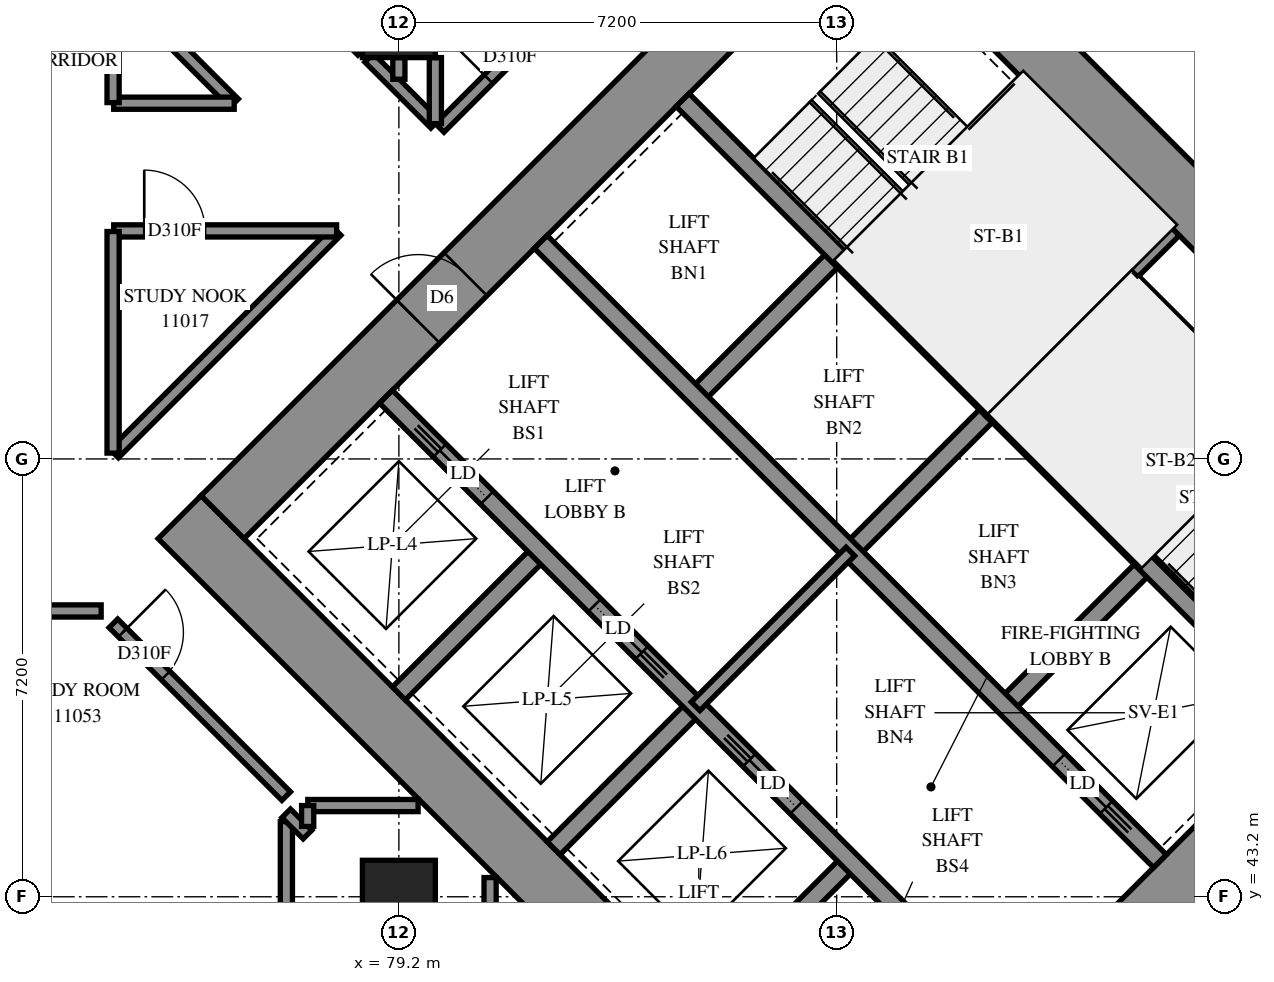
"""IFC4 building model, lengths in metres.
Left out: names, types, materials, properties, quantities, classifications, styles, units other than length and angle.
Written with IfcOpenShell. Run it as: python <this file> out.ifc"""

import sys

from ifc_helpers import new_model, si_unit, direction, frame, frame_2d, origin, origin_2d, place, context, subcontext, project, spatial, rectangle, extrude, element, fill, save


model = new_model("IFC4")
c1 = context("Model", 3, precision=1e-05, world=origin(), true_north=direction((0.0, 1.0)))
c2 = subcontext(c1, "Body", "Model", "MODEL_VIEW")
j1 = project(units=[si_unit("LENGTHUNIT", "METRE"), si_unit("PLANEANGLEUNIT", "RADIAN")], contexts=[c1])
p1 = place(None, origin())
s1 = spatial("IfcSite", under=j1, at=p1, CompositionType="ELEMENT")
p2 = place(p1, origin())
s2 = spatial("IfcBuilding", under=s1, at=p2, CompositionType="ELEMENT")
p3 = place(p2, frame((0.0, 0.0, 44.0)))
s3 = spatial("IfcBuildingStorey", under=s2, at=p3, CompositionType="ELEMENT", Elevation=44.0)
for number, where, z_axis, x_axis in (
    (1, (79.2, 43.2, 0.0), (0.0, 0.0, 1.0), (1.0, 0.0, 0.0)),
    (2, (79.2, 57.6, 0.0), (0.0, 0.0, 1.0), (1.0, 0.0, 0.0)),
):
    element("IfcColumn", number, at=place(p3, frame(where, z_axis=z_axis, x_axis=x_axis)), inside=s3, PredefinedType="COLUMN", context=c2, shape_type="SweptSolid", body=[
        extrude(rectangle(XDim=1.2, YDim=1.2, at=origin_2d()), origin(), (0.0, 0.0, 1.0), 3.1),
    ])
p4 = place(p3, frame((75.594, 49.443, -0.3), z_axis=(0.0, 0.0, 1.0), x_axis=(0.7071037324, -0.70710983, 0.0)))
e3 = element("IfcWall", 3, at=p4, inside=s3, PredefinedType="SHEAR", context=c2, shape_type="SweptSolid", body=[
    extrude(rectangle(XDim=16.4, YDim=1.0, at=frame_2d((8.2, 0.0))), origin(), (0.0, 0.0, 1.0), 2.7),
])
p5 = place(p3, frame((86.483, 60.333, -0.3), z_axis=(0.0, 0.0, 1.0), x_axis=(0.70710983, -0.7071037324, 0.0)))
e4 = element("IfcWall", 4, at=p5, inside=s3, PredefinedType="SHEAR", context=c2, shape_type="SweptSolid", body=[
    extrude(rectangle(XDim=16.4, YDim=1.0, at=frame_2d((8.2, 0.0))), origin(), (0.0, 0.0, 1.0), 2.7),
])
p6 = place(p5, frame((11.0, 0.0, 0.3)))
e5 = element("IfcOpeningElement", 5, at=p6, cuts=e4, PredefinedType="OPENING", context=c2, shape_type="SweptSolid", body=[
    extrude(rectangle(XDim=0.8, YDim=2.1, at=frame_2d((0.4, 1.05))), frame((0.0, 0.51, 0.0), z_axis=(0.0, -1.0, 0.0), x_axis=(1.0, 0.0, 0.0)), (0.0, 0.0, 1.0), 1.02),
])
p7 = place(p3, frame((76.301, 49.443, -0.3), z_axis=(0.0, 0.0, 1.0), x_axis=(0.7071067812, 0.7071067812, 0.0)))
e6 = element("IfcWall", 6, at=p7, inside=s3, PredefinedType="SHEAR", context=c2, shape_type="SweptSolid", body=[
    extrude(rectangle(XDim=14.4, YDim=1.0, at=frame_2d((7.2, 0.0))), origin(), (0.0, 0.0, 1.0), 2.7),
])
p8 = place(p7, frame((4.55, 0.0, 0.3)))
e7 = element("IfcOpeningElement", 7, at=p8, cuts=e6, PredefinedType="OPENING", context=c2, shape_type="SweptSolid", body=[
    extrude(rectangle(XDim=1.1, YDim=2.1, at=frame_2d((0.55, 1.05))), frame((0.0, 0.51, 0.0), z_axis=(0.0, -1.0, 0.0), x_axis=(1.0, 0.0, 0.0)), (0.0, 0.0, 1.0), 1.02),
])
p9 = place(p7, frame((11.35, 0.0, 0.3)))
e8 = element("IfcOpeningElement", 8, at=p9, cuts=e6, PredefinedType="OPENING", context=c2, shape_type="SweptSolid", body=[
    extrude(rectangle(XDim=1.1, YDim=2.1, at=frame_2d((0.55, 1.05))), frame((0.0, 0.51, 0.0), z_axis=(0.0, -1.0, 0.0), x_axis=(1.0, 0.0, 0.0)), (0.0, 0.0, 1.0), 1.02),
])
p10 = place(p3, frame((87.19, 38.554, -0.3), z_axis=(0.0, 0.0, 1.0), x_axis=(0.707103309, 0.7071102534, 0.0)))
e9 = element("IfcWall", 9, at=p10, inside=s3, PredefinedType="SHEAR", context=c2, shape_type="SweptSolid", body=[
    extrude(rectangle(XDim=14.4, YDim=1.0, at=frame_2d((7.2, 0.0))), origin(), (0.0, 0.0, 1.0), 2.7),
])
p11 = place(p10, frame((4.55, 0.0, 0.3)))
e10 = element("IfcOpeningElement", 10, at=p11, cuts=e9, PredefinedType="OPENING", context=c2, shape_type="SweptSolid", body=[
    extrude(rectangle(XDim=1.1, YDim=2.1, at=frame_2d((0.55, 1.05))), frame((0.0, 0.51, 0.0), z_axis=(0.0, -1.0, 0.0), x_axis=(1.0, 0.0, 0.0)), (0.0, 0.0, 1.0), 1.02),
])
p12 = place(p10, frame((11.35, 0.0, 0.3)))
e11 = element("IfcOpeningElement", 11, at=p12, cuts=e9, PredefinedType="OPENING", context=c2, shape_type="SweptSolid", body=[
    extrude(rectangle(XDim=1.1, YDim=2.1, at=frame_2d((0.55, 1.05))), frame((0.0, 0.51, 0.0), z_axis=(0.0, -1.0, 0.0), x_axis=(1.0, 0.0, 0.0)), (0.0, 0.0, 1.0), 1.02),
])
for number, where, z_axis, x_axis in (
    (12, (79.2, 46.544, 0.0), (0.0, 0.0, 1.0), (0.707, 0.707, 0.0)),
    (13, (84.079, 51.423, 0.0), (0.0, 0.0, 1.0), (0.707, 0.707, 0.0)),
):
    element("IfcWall", number, at=place(p3, frame(where, z_axis=z_axis, x_axis=x_axis)), inside=s3, PredefinedType="SOLIDWALL", context=c2, shape_type="SweptSolid", body=[
        extrude(rectangle(XDim=3.3, YDim=0.3, at=frame_2d((1.65, 0.0))), origin(), (0.0, 0.0, 1.0), 3.1),
    ])
p13 = place(p3, frame((81.746, 43.999, 0.0), z_axis=(0.0, 0.0, 1.0), x_axis=(0.7071067812, 0.7071067812, 0.0)))
e14 = element("IfcWall", 14, at=p13, inside=s3, PredefinedType="SOLIDWALL", context=c2, shape_type="SweptSolid", body=[
    extrude(rectangle(XDim=3.3, YDim=0.3, at=frame_2d((1.65, 0.0))), origin(), (0.0, 0.0, 1.0), 3.1),
])
p14 = place(p3, frame((86.625, 48.878, 0.0), z_axis=(0.0, 0.0, 1.0), x_axis=(0.7071067812, 0.7071067812, 0.0)))
e15 = element("IfcWall", 15, at=p14, inside=s3, PredefinedType="SOLIDWALL", context=c2, shape_type="SweptSolid", body=[
    extrude(rectangle(XDim=3.3, YDim=0.3, at=frame_2d((1.65, 0.0))), origin(), (0.0, 0.0, 1.0), 3.1),
])
p15 = place(p3, frame((84.291, 41.453, 0.0), z_axis=(0.0, 0.0, 1.0), x_axis=(0.7071067812, 0.7071067812, 0.0)))
e16 = element("IfcWall", 16, at=p15, inside=s3, PredefinedType="SOLIDWALL", context=c2, shape_type="SweptSolid", body=[
    extrude(rectangle(XDim=3.3, YDim=0.3, at=frame_2d((1.65, 0.0))), origin(), (0.0, 0.0, 1.0), 3.1),
])
p16 = place(p3, frame((89.17, 46.332, 0.0), z_axis=(0.0, 0.0, 1.0), x_axis=(0.7071067812, 0.7071067812, 0.0)))
e17 = element("IfcWall", 17, at=p16, inside=s3, PredefinedType="SOLIDWALL", context=c2, shape_type="SweptSolid", body=[
    extrude(rectangle(XDim=3.3, YDim=0.3, at=frame_2d((1.65, 0.0))), origin(), (0.0, 0.0, 1.0), 3.1),
])
p17 = place(p3, frame((78.988, 51.423, 0.0), z_axis=(0.0, 0.0, 1.0), x_axis=(0.7071067812, -0.7071067812, 0.0)))
e18 = element("IfcWall", 18, at=p17, inside=s3, PredefinedType="SOLIDWALL", context=c2, shape_type="SweptSolid", body=[
    extrude(rectangle(XDim=14.4, YDim=0.3, at=frame_2d((7.2, 0.0))), origin(), (0.0, 0.0, 1.0), 3.1),
])
p18 = place(p17, frame((1.25, 0.0, 0.0)))
e19 = element("IfcOpeningElement", 19, at=p18, cuts=e18, PredefinedType="OPENING", context=c2, shape_type="SweptSolid", body=[
    extrude(rectangle(XDim=1.1, YDim=2.1, at=frame_2d((0.55, 1.05))), frame((0.0, 0.16, 0.0), z_axis=(0.0, -1.0, 0.0), x_axis=(1.0, 0.0, 0.0)), (0.0, 0.0, 1.0), 0.32),
])
p19 = place(p17, frame((4.85, 0.0, 0.0)))
e20 = element("IfcOpeningElement", 20, at=p19, cuts=e18, PredefinedType="OPENING", context=c2, shape_type="SweptSolid", body=[
    extrude(rectangle(XDim=1.1, YDim=2.1, at=frame_2d((0.55, 1.05))), frame((0.0, 0.16, 0.0), z_axis=(0.0, -1.0, 0.0), x_axis=(1.0, 0.0, 0.0)), (0.0, 0.0, 1.0), 0.32),
])
p20 = place(p17, frame((8.45, 0.0, 0.0)))
e21 = element("IfcOpeningElement", 21, at=p20, cuts=e18, PredefinedType="OPENING", context=c2, shape_type="SweptSolid", body=[
    extrude(rectangle(XDim=1.1, YDim=2.1, at=frame_2d((0.55, 1.05))), frame((0.0, 0.16, 0.0), z_axis=(0.0, -1.0, 0.0), x_axis=(1.0, 0.0, 0.0)), (0.0, 0.0, 1.0), 0.32),
])
p21 = place(p17, frame((12.05, 0.0, 0.0)))
e22 = element("IfcOpeningElement", 22, at=p21, cuts=e18, PredefinedType="OPENING", context=c2, shape_type="SweptSolid", body=[
    extrude(rectangle(XDim=1.1, YDim=2.1, at=frame_2d((0.55, 1.05))), frame((0.0, 0.16, 0.0), z_axis=(0.0, -1.0, 0.0), x_axis=(1.0, 0.0, 0.0)), (0.0, 0.0, 1.0), 0.32),
])
p22 = place(p3, frame((81.534, 53.969, 0.0), z_axis=(0.0, 0.0, 1.0), x_axis=(0.707103309, -0.7071102534, 0.0)))
e23 = element("IfcWall", 23, at=p22, inside=s3, PredefinedType="SOLIDWALL", context=c2, shape_type="SweptSolid", body=[
    extrude(rectangle(XDim=14.4, YDim=0.3, at=frame_2d((7.2, 0.0))), origin(), (0.0, 0.0, 1.0), 3.1),
])
p23 = place(p22, frame((12.05, 0.0, 0.0)))
e24 = element("IfcOpeningElement", 24, at=p23, cuts=e23, PredefinedType="OPENING", context=c2, shape_type="SweptSolid", body=[
    extrude(rectangle(XDim=1.1, YDim=2.1, at=frame_2d((0.55, 1.05))), frame((0.0, 0.16, 0.0), z_axis=(0.0, -1.0, 0.0), x_axis=(1.0, 0.0, 0.0)), (0.0, 0.0, 1.0), 0.32),
])
for number, where, z_axis, x_axis in (
    (25, (83.867, 56.302, 0.0), (0.0, 0.0, 1.0), (0.707, -0.707, 0.0)),
    (26, (88.958, 51.211, 0.0), (0.0, 0.0, 1.0), (0.707, -0.707, 0.0)),
):
    element("IfcWall", number, at=place(p3, frame(where, z_axis=z_axis, x_axis=x_axis)), inside=s3, PredefinedType="SOLIDWALL", context=c2, shape_type="SweptSolid", body=[
        extrude(rectangle(XDim=7.2, YDim=0.3, at=frame_2d((3.6, 0.0))), origin(), (0.0, 0.0, 1.0), 3.1),
    ])
p24 = place(p3, frame((88.958, 51.211, 0.0), z_axis=(0.0, 0.0, 1.0), x_axis=(0.7071067812, 0.7071067812, 0.0)))
e27 = element("IfcWall", 27, at=p24, inside=s3, PredefinedType="SOLIDWALL", context=c2, shape_type="SweptSolid", body=[
    extrude(rectangle(XDim=4.2, YDim=0.3, at=frame_2d((2.1, 0.0))), origin(), (0.0, 0.0, 1.0), 3.1),
])
p25 = place(p3, frame((91.313, 53.354, 0.0), z_axis=(0.0, 0.0, 1.0), x_axis=(0.7071140275, -0.7070995348, 0.0)))
e28 = element("IfcWall", 28, at=p25, inside=s3, PredefinedType="PARTITIONING", context=c2, shape_type="SweptSolid", body=[
    extrude(rectangle(XDim=6.9, YDim=0.15, at=frame_2d((3.45, 0.0))), origin(), (0.0, 0.0, 1.0), 3.1),
])
p26 = place(p3, frame((84.079, 46.332, 0.0), z_axis=(0.0, 0.0, 1.0), x_axis=(0.7071067812, 0.7071067812, 0.0)))
e29 = element("IfcWall", 29, at=p26, inside=s3, PredefinedType="PARTITIONING", context=c2, shape_type="SweptSolid", body=[
    extrude(rectangle(XDim=3.6, YDim=0.2, at=frame_2d((1.8, 0.0))), origin(), (0.0, 0.0, 1.0), 3.1),
])
p27 = place(p3, frame((55.1, 47.9, 0.0), z_axis=(0.0, 0.0, 1.0), x_axis=(1.0, 0.0, 0.0)))
e30 = element("IfcWall", 30, at=p27, inside=s3, PredefinedType="PARTITIONING", context=c2, shape_type="SweptSolid", body=[
    extrude(rectangle(XDim=19.204, YDim=0.2, at=frame_2d((9.602, 0.0))), origin(), (0.0, 0.0, 1.0), 3.1),
])
p28 = place(p27, frame((6.399, 0.0, 0.0)))
e31 = element("IfcOpeningElement", 31, at=p28, cuts=e30, PredefinedType="OPENING", context=c2, shape_type="SweptSolid", body=[
    extrude(rectangle(XDim=0.9, YDim=2.1, at=frame_2d((0.45, 1.05))), frame((0.0, 0.11, 0.0), z_axis=(0.0, -1.0, 0.0), x_axis=(1.0, 0.0, 0.0)), (0.0, 0.0, 1.0), 0.22),
])
p29 = place(p27, frame((13.599, 0.0, 0.0)))
e32 = element("IfcOpeningElement", 32, at=p29, cuts=e30, PredefinedType="OPENING", context=c2, shape_type="SweptSolid", body=[
    extrude(rectangle(XDim=0.9, YDim=2.1, at=frame_2d((0.45, 1.05))), frame((0.0, 0.11, 0.0), z_axis=(0.0, -1.0, 0.0), x_axis=(1.0, 0.0, 0.0)), (0.0, 0.0, 1.0), 0.22),
])
p30 = place(p3, frame((79.871, 55.843, 0.0), z_axis=(0.0, 0.0, 1.0), x_axis=(0.7071067812, 0.7071067812, 0.0)))
e33 = element("IfcWall", 33, at=p30, inside=s3, PredefinedType="PARTITIONING", context=c2, shape_type="SweptSolid", body=[
    extrude(rectangle(XDim=9.85, YDim=0.2, at=frame_2d((4.925, 0.0))), origin(), (0.0, 0.0, 1.0), 3.1),
])
p31 = place(p30, frame((1.135, 0.0, 0.0)))
e34 = element("IfcOpeningElement", 34, at=p31, cuts=e33, PredefinedType="OPENING", context=c2, shape_type="SweptSolid", body=[
    extrude(rectangle(XDim=1.0, YDim=2.1, at=frame_2d((0.5, 1.05))), frame((0.0, 0.11, 0.0), z_axis=(0.0, -1.0, 0.0), x_axis=(1.0, 0.0, 0.0)), (0.0, 0.0, 1.0), 0.22),
])
p32 = place(p3, frame((89.451, 60.189, 0.0), z_axis=(0.0, 0.0, 1.0), x_axis=(0.7071796965, -0.7070338583, 0.0)))
e35 = element("IfcWall", 35, at=p32, inside=s3, PredefinedType="PARTITIONING", context=c2, shape_type="SweptSolid", body=[
    extrude(rectangle(XDim=9.6, YDim=0.2, at=frame_2d((4.8, 0.0))), origin(), (0.0, 0.0, 1.0), 3.1),
])
p33 = place(p32, frame((7.315, 0.0, 0.0)))
e36 = element("IfcOpeningElement", 36, at=p33, cuts=e35, PredefinedType="OPENING", context=c2, shape_type="SweptSolid", body=[
    extrude(rectangle(XDim=0.9, YDim=2.1, at=frame_2d((0.45, 1.05))), frame((0.0, 0.11, 0.0), z_axis=(0.0, -1.0, 0.0), x_axis=(1.0, 0.0, 0.0)), (0.0, 0.0, 1.0), 0.22),
])
p34 = place(p3, frame((74.773, 60.935, 0.0), z_axis=(0.0, 0.0, 1.0), x_axis=(0.7071067812, -0.7071067812, 0.0)))
e37 = element("IfcWall", 37, at=p34, inside=s3, PredefinedType="PARTITIONING", context=c2, shape_type="SweptSolid", body=[
    extrude(rectangle(XDim=5.408, YDim=0.2, at=frame_2d((2.704, 0.0))), origin(), (0.0, 0.0, 1.0), 3.1),
])
p35 = place(p3, frame((74.517, 50.489, 0.0), z_axis=(0.0, 0.0, 1.0), x_axis=(0.7071067812, 0.7071067812, 0.0)))
e38 = element("IfcWall", 38, at=p35, inside=s3, PredefinedType="PARTITIONING", context=c2, shape_type="SweptSolid", body=[
    extrude(rectangle(XDim=5.176, YDim=0.2, at=frame_2d((2.588, 0.0))), origin(), (0.0, 0.0, 1.0), 3.1),
])
p36 = place(p3, frame((74.505, 47.697, 0.0), z_axis=(0.0, 0.0, 1.0), x_axis=(0.7071067812, -0.7071067812, 0.0)))
e39 = element("IfcWall", 39, at=p36, inside=s3, PredefinedType="PARTITIONING", context=c2, shape_type="SweptSolid", body=[
    extrude(rectangle(XDim=4.019, YDim=0.2, at=frame_2d((2.01, 0.0))), origin(), (0.0, 0.0, 1.0), 3.1),
])
p37 = place(p36, frame((0.215, 0.0, 0.0)))
e40 = element("IfcOpeningElement", 40, at=p37, cuts=e39, PredefinedType="OPENING", context=c2, shape_type="SweptSolid", body=[
    extrude(rectangle(XDim=1.0, YDim=2.1, at=frame_2d((0.5, 1.05))), frame((0.0, 0.11, 0.0), z_axis=(0.0, -1.0, 0.0), x_axis=(1.0, 0.0, 0.0)), (0.0, 0.0, 1.0), 0.22),
])
p38 = place(p3, frame((74.51, 54.15, 0.0), z_axis=(0.0, 0.0, 1.0), x_axis=(1.0, 0.0, 0.0)))
e41 = element("IfcWall", 41, at=p38, inside=s3, PredefinedType="PARTITIONING", context=c2, shape_type="SweptSolid", body=[
    extrude(rectangle(XDim=3.666, YDim=0.2, at=frame_2d((1.833, 0.0))), origin(), (0.0, 0.0, 1.0), 3.1),
])
p39 = place(p38, frame((0.502, 0.0, 0.0)))
e42 = element("IfcOpeningElement", 42, at=p39, cuts=e41, PredefinedType="OPENING", context=c2, shape_type="SweptSolid", body=[
    extrude(rectangle(XDim=1.0, YDim=2.1, at=frame_2d((0.5, 1.05))), frame((0.0, 0.11, 0.0), z_axis=(0.0, -1.0, 0.0), x_axis=(1.0, 0.0, 0.0)), (0.0, 0.0, 1.0), 0.22),
])
p40 = place(p3, frame((74.5, 50.496, 0.0), z_axis=(0.0, 0.0, 1.0), x_axis=(0.0, 1.0, 0.0)))
e43 = element("IfcWall", 43, at=p40, inside=s3, PredefinedType="PARTITIONING", context=c2, shape_type="SweptSolid", body=[
    extrude(rectangle(XDim=3.644, YDim=0.2, at=frame_2d((1.822, 0.0))), origin(), (0.0, 0.0, 1.0), 3.1),
])
p41 = place(p3, frame((77.35, 41.108, 0.0), z_axis=(0.0, 0.0, 1.0), x_axis=(0.0, 1.0, 0.0)))
e44 = element("IfcWall", 44, at=p41, inside=s3, PredefinedType="PARTITIONING", context=c2, shape_type="SweptSolid", body=[
    extrude(rectangle(XDim=3.329, YDim=0.2, at=frame_2d((1.664, 0.0))), origin(), (0.0, 0.0, 1.0), 3.1),
])
p42 = place(p3, frame((74.697, 58.041, 0.0), z_axis=(0.0, 0.0, 1.0), x_axis=(0.7071067812, -0.7071067812, 0.0)))
e45 = element("IfcWall", 45, at=p42, inside=s3, PredefinedType="PARTITIONING", context=c2, shape_type="SweptSolid", body=[
    extrude(rectangle(XDim=2.534, YDim=0.2, at=frame_2d((1.267, 0.0))), origin(), (0.0, 0.0, 1.0), 3.1),
])
p43 = place(p3, frame((74.51, 56.25, 0.0), z_axis=(0.0, 0.0, 1.0), x_axis=(1.0, 0.0, 0.0)))
e46 = element("IfcWall", 46, at=p43, inside=s3, PredefinedType="PARTITIONING", context=c2, shape_type="SweptSolid", body=[
    extrude(rectangle(XDim=1.982, YDim=0.2, at=frame_2d((0.991, 0.0))), origin(), (0.0, 0.0, 1.0), 3.1),
])
p44 = place(p3, frame((74.5, 56.26, 0.0), z_axis=(0.0, 0.0, 1.0), x_axis=(0.0, 1.0, 0.0)))
e47 = element("IfcWall", 47, at=p44, inside=s3, PredefinedType="PARTITIONING", context=c2, shape_type="SweptSolid", body=[
    extrude(rectangle(XDim=1.96, YDim=0.2, at=frame_2d((0.98, 0.0))), origin(), (0.0, 0.0, 1.0), 3.1),
])
for number, where, z_axis, x_axis in (
    (48, (77.702, 44.7, 0.0), (0.0, 0.0, 1.0), (1.0, 0.0, 0.0)),
    (49, (80.7, 41.702, 0.0), (0.0, 0.0, 1.0), (0.0, 1.0, 0.0)),
):
    element("IfcWall", number, at=place(p3, frame(where, z_axis=z_axis, x_axis=x_axis)), inside=s3, PredefinedType="PARTITIONING", context=c2, shape_type="SweptSolid", body=[
        extrude(rectangle(XDim=1.814, YDim=0.2, at=frame_2d((0.907, 0.0))), origin(), (0.0, 0.0, 1.0), 3.1),
    ])
p45 = place(p3, frame((78.711, 56.997, 0.0), z_axis=(0.0, 0.0, 1.0), x_axis=(0.7071067812, -0.7071067812, 0.0)))
e50 = element("IfcWall", 50, at=p45, inside=s3, PredefinedType="PARTITIONING", context=c2, shape_type="SweptSolid", body=[
    extrude(rectangle(XDim=1.536, YDim=0.2, at=frame_2d((0.768, 0.0))), origin(), (0.0, 0.0, 1.0), 3.1),
])
p46 = place(p3, frame((79.8, 55.914, 0.0), z_axis=(0.0, 0.0, 1.0), x_axis=(0.0, 1.0, 0.0)))
e51 = element("IfcWall", 51, at=p46, inside=s3, PredefinedType="PARTITIONING", context=c2, shape_type="SweptSolid", body=[
    extrude(rectangle(XDim=1.086, YDim=0.2, at=frame_2d((0.543, 0.0))), origin(), (0.0, 0.0, 1.0), 3.1),
])
p47 = place(p3, frame((77.347, 44.573, 0.0), z_axis=(0.0, 0.0, 1.0), x_axis=(0.7071067812, -0.7071067812, 0.0)))
e52 = element("IfcWall", 52, at=p47, inside=s3, PredefinedType="PARTITIONING", context=c2, shape_type="SweptSolid", body=[
    extrude(rectangle(XDim=0.495, YDim=0.2, at=frame_2d((0.247, 0.0))), origin(), (0.0, 0.0, 1.0), 3.1),
])
p48 = place(p3, frame((79.2, 56.644, 0.0), z_axis=(0.0, 0.0, 1.0), x_axis=(0.0, 1.0, 0.0)))
e53 = element("IfcWall", 53, at=p48, inside=s3, PredefinedType="PARTITIONING", context=c2, shape_type="SweptSolid", body=[
    extrude(rectangle(XDim=0.356, YDim=0.2, at=frame_2d((0.178, 0.0))), origin(), (0.0, 0.0, 1.0), 3.1),
])
p49 = place(p3, frame((77.7, 44.356, 0.0), z_axis=(0.0, 0.0, 1.0), x_axis=(0.0, 1.0, 0.0)))
e54 = element("IfcWall", 54, at=p49, inside=s3, PredefinedType="PARTITIONING", context=c2, shape_type="SweptSolid", body=[
    extrude(rectangle(XDim=0.344, YDim=0.2, at=frame_2d((0.172, 0.0))), origin(), (0.0, 0.0, 1.0), 3.1),
])
p50 = place(p8, origin())
e55 = element("IfcDoor", 55, at=p50, inside=s3, OperationType="DOUBLE_DOOR_SINGLE_SWING", PredefinedType="DOOR", context=c2, shape_type="SweptSolid", body=[
    extrude(rectangle(XDim=1.1, YDim=2.1, at=frame_2d((0.55, 1.05))), frame((0.0, 0.025, 0.0), z_axis=(0.0, -1.0, 0.0), x_axis=(1.0, 0.0, 0.0)), (0.0, 0.0, 1.0), 0.05),
])
fill(e7, e55)
p51 = place(p18, origin())
e56 = element("IfcDoor", 56, at=p51, inside=s3, OperationType="SLIDING_TO_LEFT", PredefinedType="DOOR", context=c2, shape_type="SweptSolid", body=[
    extrude(rectangle(XDim=1.1, YDim=2.1, at=frame_2d((0.55, 1.05))), frame((0.0, 0.025, 0.0), z_axis=(0.0, -1.0, 0.0), x_axis=(1.0, 0.0, 0.0)), (0.0, 0.0, 1.0), 0.05),
])
fill(e19, e56)
p52 = place(p19, origin())
e57 = element("IfcDoor", 57, at=p52, inside=s3, OperationType="SLIDING_TO_RIGHT", PredefinedType="DOOR", context=c2, shape_type="SweptSolid", body=[
    extrude(rectangle(XDim=1.1, YDim=2.1, at=frame_2d((0.55, 1.05))), frame((0.0, 0.025, 0.0), z_axis=(0.0, -1.0, 0.0), x_axis=(1.0, 0.0, 0.0)), (0.0, 0.0, 1.0), 0.05),
])
fill(e20, e57)
p53 = place(p20, origin())
e58 = element("IfcDoor", 58, at=p53, inside=s3, OperationType="SLIDING_TO_LEFT", PredefinedType="DOOR", context=c2, shape_type="SweptSolid", body=[
    extrude(rectangle(XDim=1.1, YDim=2.1, at=frame_2d((0.55, 1.05))), frame((0.0, 0.025, 0.0), z_axis=(0.0, -1.0, 0.0), x_axis=(1.0, 0.0, 0.0)), (0.0, 0.0, 1.0), 0.05),
])
fill(e21, e58)
p54 = place(p23, origin())
e59 = element("IfcDoor", 59, at=p54, inside=s3, OperationType="SLIDING_TO_RIGHT", PredefinedType="DOOR", context=c2, shape_type="SweptSolid", body=[
    extrude(rectangle(XDim=1.1, YDim=2.1, at=frame_2d((0.55, 1.05))), frame((0.0, 0.025, 0.0), z_axis=(0.0, -1.0, 0.0), x_axis=(1.0, 0.0, 0.0)), (0.0, 0.0, 1.0), 0.05),
])
fill(e24, e59)
p55 = place(p39, origin())
e60 = element("IfcDoor", 60, at=p55, inside=s3, OperationType="SINGLE_SWING_RIGHT", PredefinedType="DOOR", context=c2, shape_type="SweptSolid", body=[
    extrude(rectangle(XDim=1.0, YDim=2.1, at=frame_2d((0.5, 1.05))), frame((0.0, 0.025, 0.0), z_axis=(0.0, -1.0, 0.0), x_axis=(1.0, 0.0, 0.0)), (0.0, 0.0, 1.0), 0.05),
])
fill(e42, e60)
p56 = place(p37, origin())
e61 = element("IfcDoor", 61, at=p56, inside=s3, OperationType="SINGLE_SWING_LEFT", PredefinedType="DOOR", context=c2, shape_type="SweptSolid", body=[
    extrude(rectangle(XDim=1.0, YDim=2.1, at=frame_2d((0.5, 1.05))), frame((0.0, 0.025, 0.0), z_axis=(0.0, -1.0, 0.0), x_axis=(1.0, 0.0, 0.0)), (0.0, 0.0, 1.0), 0.05),
])
fill(e40, e61)
p57 = place(p31, origin())
e62 = element("IfcDoor", 62, at=p57, inside=s3, OperationType="SINGLE_SWING_RIGHT", PredefinedType="DOOR", context=c2, shape_type="SweptSolid", body=[
    extrude(rectangle(XDim=1.0, YDim=2.1, at=frame_2d((0.5, 1.05))), frame((0.0, 0.025, 0.0), z_axis=(0.0, -1.0, 0.0), x_axis=(1.0, 0.0, 0.0)), (0.0, 0.0, 1.0), 0.05),
])
fill(e34, e62)
save(model, sys.argv[1])
